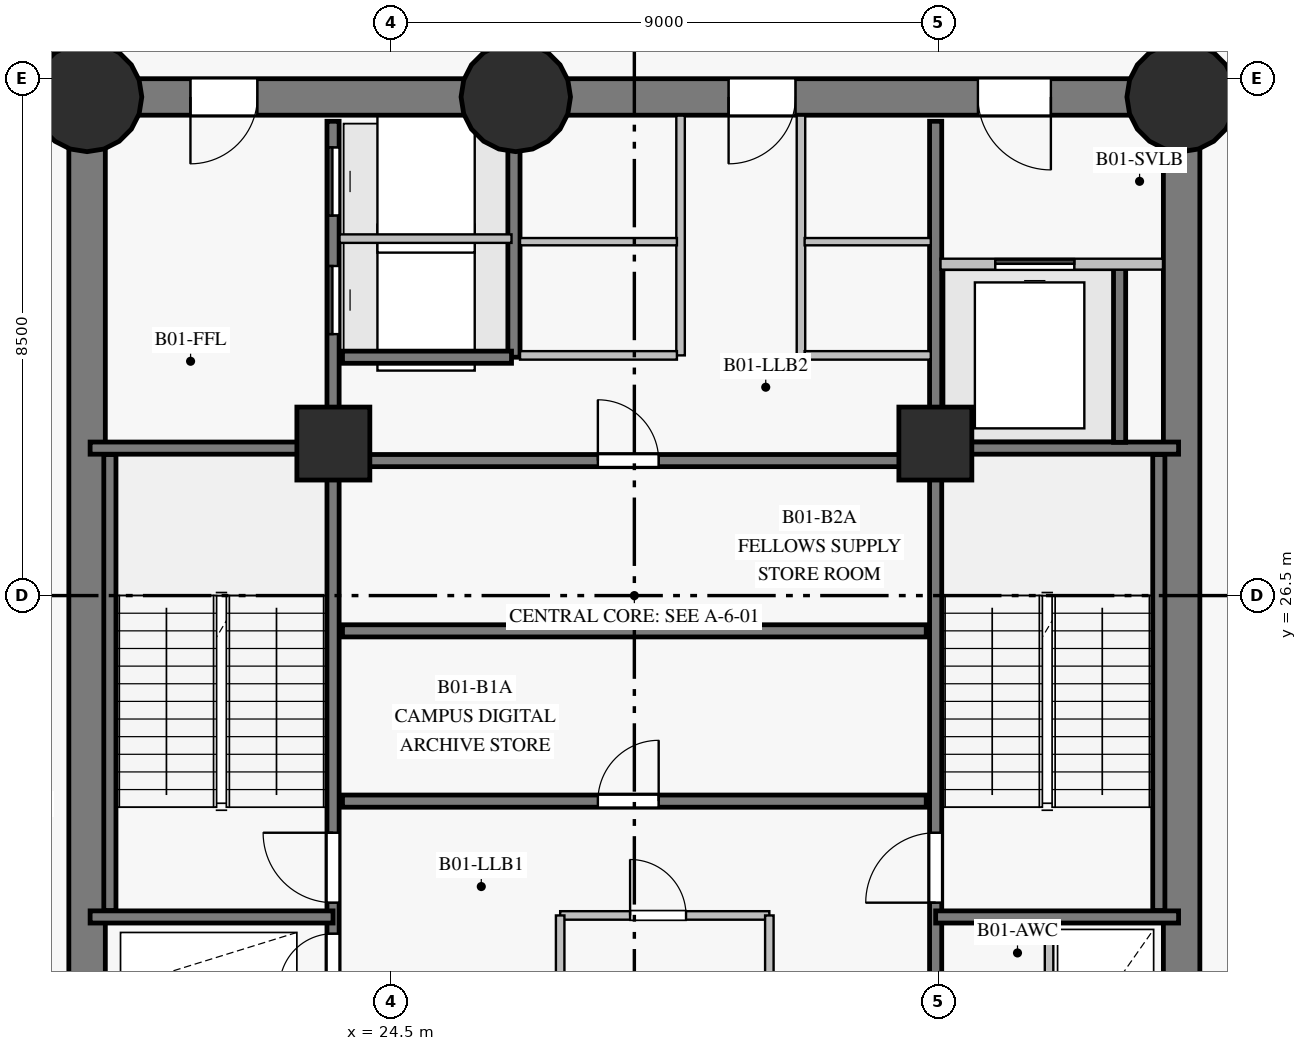
"""IFC4 building model, lengths in metres.
Left out: names, types, materials, properties, quantities, classifications, styles, units other than length and angle.
Written with IfcOpenShell. Run it as: python <this file> out.ifc"""

import sys

from ifc_helpers import new_model, si_unit, direction, frame, frame_2d, origin, origin_with_axes, origin_2d, place, context, subcontext, project, spatial, rectangle, circle, extrude, source, transform, mapped, element, fill, save


model = new_model("IFC4")
c1 = context("Model", 3, precision=1e-05, world=origin(), true_north=direction((0.0, 1.0)))
c2 = subcontext(c1, "Body", "Model", "MODEL_VIEW")
j1 = project(units=[si_unit("LENGTHUNIT", "METRE"), si_unit("PLANEANGLEUNIT", "RADIAN")], contexts=[c1])
p1 = place(None, origin())
s1 = spatial("IfcSite", under=j1, at=p1, CompositionType="ELEMENT")
p2 = place(p1, origin())
s2 = spatial("IfcBuilding", under=s1, at=p2, CompositionType="ELEMENT")
p3 = place(p2, frame((0.0, 0.0, -4.2)))
s3 = spatial("IfcBuildingStorey", under=s2, at=p3, CompositionType="ELEMENT", Elevation=-4.2)
p4 = place(p3, frame((37.5, 18.3, 0.0), z_axis=(0.0, 0.0, 1.0), x_axis=(0.0, 1.0, 0.0)))
e1 = element("IfcWall", 1, at=p4, inside=s3, PredefinedType="SHEAR", context=c2, shape_type="SweptSolid", body=[
    extrude(rectangle(XDim=16.4, YDim=0.6, at=frame_2d((8.2, 0.0))), origin(), (0.0, 0.0, 1.0), 3.85),
])
p5 = place(p3, frame((37.5, 34.7, 0.0), z_axis=(0.0, 0.0, 1.0), x_axis=(-1.0, 0.0, 0.0)))
e2 = element("IfcWall", 2, at=p5, inside=s3, PredefinedType="SHEAR", context=c2, shape_type="SweptSolid", body=[
    extrude(rectangle(XDim=10.95, YDim=0.6, at=frame_2d((5.475, 0.0))), origin(), (0.0, 0.0, 1.0), 3.85),
])
p6 = place(p5, frame((2.15, 0.0, 0.0)))
e3 = element("IfcOpeningElement", 3, at=p6, cuts=e2, PredefinedType="OPENING", context=c2, shape_type="SweptSolid", body=[
    extrude(rectangle(XDim=1.2, YDim=2.15, at=frame_2d((0.6, 1.075))), frame((0.0, 0.31, 0.0), z_axis=(0.0, -1.0, 0.0), x_axis=(1.0, 0.0, 0.0)), (0.0, 0.0, 1.0), 0.62),
])
p7 = place(p5, frame((6.35, 0.0, 0.0)))
e4 = element("IfcOpeningElement", 4, at=p7, cuts=e2, PredefinedType="OPENING", context=c2, shape_type="SweptSolid", body=[
    extrude(rectangle(XDim=1.1, YDim=2.15, at=frame_2d((0.55, 1.075))), frame((0.0, 0.31, 0.0), z_axis=(0.0, -1.0, 0.0), x_axis=(1.0, 0.0, 0.0)), (0.0, 0.0, 1.0), 0.62),
])
p8 = place(p3, frame((26.55, 34.7, 0.0), z_axis=(0.0, 0.0, 1.0), x_axis=(-1.0, 0.0, 0.0)))
e5 = element("IfcWall", 5, at=p8, inside=s3, PredefinedType="SHEAR", context=c2, shape_type="SweptSolid", body=[
    extrude(rectangle(XDim=7.05, YDim=0.6, at=frame_2d((3.525, 0.0))), origin(), (0.0, 0.0, 1.0), 3.85),
])
p9 = place(p8, frame((4.25, 0.0, 0.0)))
e6 = element("IfcOpeningElement", 6, at=p9, cuts=e5, PredefinedType="OPENING", context=c2, shape_type="SweptSolid", body=[
    extrude(rectangle(XDim=1.1, YDim=2.15, at=frame_2d((0.55, 1.075))), frame((0.0, 0.31, 0.0), z_axis=(0.0, -1.0, 0.0), x_axis=(1.0, 0.0, 0.0)), (0.0, 0.0, 1.0), 0.62),
])
p10 = place(p3, frame((19.5, 34.7, 0.0), z_axis=(0.0, 0.0, 1.0), x_axis=(0.0, -1.0, 0.0)))
e7 = element("IfcWall", 7, at=p10, inside=s3, PredefinedType="SHEAR", context=c2, shape_type="SweptSolid", body=[
    extrude(rectangle(XDim=16.4, YDim=0.6, at=frame_2d((8.2, 0.0))), origin(), (0.0, 0.0, 1.0), 3.85),
])
m1 = source(origin_with_axes(), c2, "Body", "SweptSolid", [
    extrude(circle(Radius=0.9, at=origin_2d()), origin(), (0.0, 0.0, 1.0), 4.2),
])
for number, where, z_axis, x_axis in (
    (8, (19.5, 34.7, 0.0), (0.0, 0.0, 1.0), (1.0, 0.0, 0.0)),
    (9, (26.55, 34.7, 0.0), (0.0, 0.0, 1.0), (1.0, 0.0, 0.0)),
    (10, (37.5, 34.7, 0.0), (0.0, 0.0, 1.0), (1.0, 0.0, 0.0)),
):
    element("IfcColumn", number, at=place(p3, frame(where, z_axis=z_axis, x_axis=x_axis)), inside=s3, PredefinedType="COLUMN", context=c2, shape_type="MappedRepresentation", body=[
        mapped(m1, transform((0.0, 0.0, 0.0), scale=1.0)),
    ])
m2 = source(origin_with_axes(), c2, "Body", "SweptSolid", [
    extrude(rectangle(XDim=1.2, YDim=1.2, at=origin_2d()), origin(), (0.0, 0.0, 1.0), 4.2),
])
for number, where, z_axis, x_axis in (
    (11, (23.55, 29.0, 0.0), (0.0, 0.0, 1.0), (1.0, 0.0, 0.0)),
    (12, (33.45, 29.0, 0.0), (0.0, 0.0, 1.0), (1.0, 0.0, 0.0)),
):
    element("IfcColumn", number, at=place(p3, frame(where, z_axis=z_axis, x_axis=x_axis)), inside=s3, PredefinedType="COLUMN", context=c2, shape_type="MappedRepresentation", body=[
        mapped(m2, transform((0.0, 0.0, 0.0), scale=1.0)),
    ])
p11 = place(p3, frame((23.545, 18.7, 0.0), z_axis=(0.0, 0.0, 1.0), x_axis=(0.0, 1.0, 0.0)))
e13 = element("IfcWall", 13, at=p11, inside=s3, PredefinedType="SHEAR", context=c2, shape_type="SweptSolid", body=[
    extrude(rectangle(XDim=15.6, YDim=0.2, at=frame_2d((7.8, 0.0))), origin(), (0.0, 0.0, 1.0), 3.85),
])
p12 = place(p11, frame((2.75, 0.0, 0.0)))
e14 = element("IfcOpeningElement", 14, at=p12, cuts=e13, PredefinedType="OPENING", context=c2, shape_type="SweptSolid", body=[
    extrude(rectangle(XDim=1.15, YDim=2.15, at=frame_2d((0.575, 1.075))), frame((0.0, 0.11, 0.0), z_axis=(0.0, -1.0, 0.0), x_axis=(1.0, 0.0, 0.0)), (0.0, 0.0, 1.0), 0.22),
])
p13 = place(p11, frame((0.14, 0.0, 0.0)))
e15 = element("IfcOpeningElement", 15, at=p13, cuts=e13, PredefinedType="OPENING", context=c2, shape_type="SweptSolid", body=[
    extrude(rectangle(XDim=0.88, YDim=2.1, at=frame_2d((0.44, 1.05))), frame((0.0, 0.11, 0.0), z_axis=(0.0, -1.0, 0.0), x_axis=(1.0, 0.0, 0.0)), (0.0, 0.0, 1.0), 0.22),
])
p14 = place(p11, frame((1.36, 0.0, 0.0)))
e16 = element("IfcOpeningElement", 16, at=p14, cuts=e13, PredefinedType="OPENING", context=c2, shape_type="SweptSolid", body=[
    extrude(rectangle(XDim=0.88, YDim=2.1, at=frame_2d((0.44, 1.05))), frame((0.0, 0.11, 0.0), z_axis=(0.0, -1.0, 0.0), x_axis=(1.0, 0.0, 0.0)), (0.0, 0.0, 1.0), 0.22),
])
p15 = place(p11, frame((12.1, 0.0, 0.0)))
e17 = element("IfcOpeningElement", 17, at=p15, cuts=e13, PredefinedType="OPENING", context=c2, shape_type="SweptSolid", body=[
    extrude(rectangle(XDim=1.12, YDim=2.15, at=frame_2d((0.56, 1.075))), frame((0.0, 0.11, 0.0), z_axis=(0.0, -1.0, 0.0), x_axis=(1.0, 0.0, 0.0)), (0.0, 0.0, 1.0), 0.22),
])
p16 = place(p11, frame((14.05, 0.0, 0.0)))
e18 = element("IfcOpeningElement", 18, at=p16, cuts=e13, PredefinedType="OPENING", context=c2, shape_type="SweptSolid", body=[
    extrude(rectangle(XDim=1.12, YDim=2.15, at=frame_2d((0.56, 1.075))), frame((0.0, 0.11, 0.0), z_axis=(0.0, -1.0, 0.0), x_axis=(1.0, 0.0, 0.0)), (0.0, 0.0, 1.0), 0.22),
])
p17 = place(p3, frame((33.455, 18.7, 0.0), z_axis=(0.0, 0.0, 1.0), x_axis=(0.0, 1.0, 0.0)))
e19 = element("IfcWall", 19, at=p17, inside=s3, PredefinedType="SHEAR", context=c2, shape_type="SweptSolid", body=[
    extrude(rectangle(XDim=15.6, YDim=0.2, at=frame_2d((7.8, 0.0))), origin(), (0.0, 0.0, 1.0), 3.85),
])
p18 = place(p17, frame((2.75, 0.0, 0.0)))
e20 = element("IfcOpeningElement", 20, at=p18, cuts=e19, PredefinedType="OPENING", context=c2, shape_type="SweptSolid", body=[
    extrude(rectangle(XDim=1.15, YDim=2.15, at=frame_2d((0.575, 1.075))), frame((0.0, 0.11, 0.0), z_axis=(0.0, -1.0, 0.0), x_axis=(1.0, 0.0, 0.0)), (0.0, 0.0, 1.0), 0.22),
])
p19 = place(p17, frame((0.55, 0.0, 0.0)))
e21 = element("IfcOpeningElement", 21, at=p19, cuts=e19, PredefinedType="OPENING", context=c2, shape_type="SweptSolid", body=[
    extrude(rectangle(XDim=0.94, YDim=2.1, at=frame_2d((0.47, 1.05))), frame((0.0, 0.11, 0.0), z_axis=(0.0, -1.0, 0.0), x_axis=(1.0, 0.0, 0.0)), (0.0, 0.0, 1.0), 0.22),
])
p20 = place(p3, frame((23.7, 23.12, 0.0), z_axis=(0.0, 0.0, 1.0), x_axis=(1.0, 0.0, 0.0)))
e22 = element("IfcWall", 22, at=p20, inside=s3, PredefinedType="SHEAR", context=c2, shape_type="SweptSolid", body=[
    extrude(rectangle(XDim=9.6, YDim=0.2, at=frame_2d((4.8, 0.0))), origin(), (0.0, 0.0, 1.0), 3.85),
])
p21 = place(p20, frame((4.2, 0.0, 0.0)))
e23 = element("IfcOpeningElement", 23, at=p21, cuts=e22, PredefinedType="OPENING", context=c2, shape_type="SweptSolid", body=[
    extrude(rectangle(XDim=1.0, YDim=2.15, at=frame_2d((0.5, 1.075))), frame((0.0, 0.11, 0.0), z_axis=(0.0, -1.0, 0.0), x_axis=(1.0, 0.0, 0.0)), (0.0, 0.0, 1.0), 0.22),
])
p22 = place(p3, frame((23.7, 25.92, 0.0), z_axis=(0.0, 0.0, 1.0), x_axis=(1.0, 0.0, 0.0)))
e24 = element("IfcWall", 24, at=p22, inside=s3, PredefinedType="SHEAR", context=c2, shape_type="SweptSolid", body=[
    extrude(rectangle(XDim=9.6, YDim=0.2, at=frame_2d((4.8, 0.0))), origin(), (0.0, 0.0, 1.0), 3.85),
])
p23 = place(p3, frame((23.7, 28.72, 0.0), z_axis=(0.0, 0.0, 1.0), x_axis=(1.0, 0.0, 0.0)))
e25 = element("IfcWall", 25, at=p23, inside=s3, PredefinedType="SHEAR", context=c2, shape_type="SweptSolid", body=[
    extrude(rectangle(XDim=9.6, YDim=0.2, at=frame_2d((4.8, 0.0))), origin(), (0.0, 0.0, 1.0), 3.85),
])
p24 = place(p23, frame((4.2, 0.0, 0.0)))
e26 = element("IfcOpeningElement", 26, at=p24, cuts=e25, PredefinedType="OPENING", context=c2, shape_type="SweptSolid", body=[
    extrude(rectangle(XDim=1.0, YDim=2.15, at=frame_2d((0.5, 1.075))), frame((0.0, 0.11, 0.0), z_axis=(0.0, -1.0, 0.0), x_axis=(1.0, 0.0, 0.0)), (0.0, 0.0, 1.0), 0.22),
])
for number, where, z_axis, x_axis in (
    (27, (19.875, 21.32, 0.0), (0.0, 0.0, 1.0), (0.0, 1.0, 0.0)),
    (28, (37.125, 21.32, 0.0), (0.0, 0.0, 1.0), (0.0, 1.0, 0.0)),
):
    element("IfcWall", number, at=place(p3, frame(where, z_axis=z_axis, x_axis=x_axis)), inside=s3, PredefinedType="SHEAR", context=c2, shape_type="SweptSolid", body=[
        extrude(rectangle(XDim=7.5, YDim=0.2, at=frame_2d((3.75, 0.0))), origin(), (0.0, 0.0, 1.0), 3.85),
    ])
for number, where, z_axis, x_axis in (
    (29, (33.455, 21.215, 0.0), (0.0, 0.0, 1.0), (1.0, 0.0, 0.0)),
    (30, (33.455, 28.925, 0.0), (0.0, 0.0, 1.0), (1.0, 0.0, 0.0)),
    (31, (19.55, 21.215, 0.0), (0.0, 0.0, 1.0), (1.0, 0.0, 0.0)),
    (32, (19.55, 28.925, 0.0), (0.0, 0.0, 1.0), (1.0, 0.0, 0.0)),
):
    element("IfcWall", number, at=place(p3, frame(where, z_axis=z_axis, x_axis=x_axis)), inside=s3, PredefinedType="SHEAR", context=c2, shape_type="SweptSolid", body=[
        extrude(rectangle(XDim=3.995, YDim=0.2, at=frame_2d((1.998, 0.0))), origin(), (0.0, 0.0, 1.0), 3.85),
    ])
p25 = place(p3, frame((26.52, 30.42, 0.0), z_axis=(0.0, 0.0, 1.0), x_axis=(0.0, 1.0, 0.0)))
e33 = element("IfcWall", 33, at=p25, inside=s3, PredefinedType="SHEAR", context=c2, shape_type="SweptSolid", body=[
    extrude(rectangle(XDim=3.86, YDim=0.2, at=frame_2d((1.93, 0.0))), origin(), (0.0, 0.0, 1.0), 3.85),
])
p26 = place(p3, frame((36.48, 29.02, 0.0), z_axis=(0.0, 0.0, 1.0), x_axis=(0.0, 1.0, 0.0)))
e34 = element("IfcWall", 34, at=p26, inside=s3, PredefinedType="SHEAR", context=c2, shape_type="SweptSolid", body=[
    extrude(rectangle(XDim=2.86, YDim=0.2, at=frame_2d((1.43, 0.0))), origin(), (0.0, 0.0, 1.0), 3.85),
])
p27 = place(p3, frame((23.7, 30.42, 0.0), z_axis=(0.0, 0.0, 1.0), x_axis=(1.0, 0.0, 0.0)))
e35 = element("IfcWall", 35, at=p27, inside=s3, PredefinedType="SHEAR", context=c2, shape_type="SweptSolid", body=[
    extrude(rectangle(XDim=2.78, YDim=0.2, at=frame_2d((1.39, 0.0))), origin(), (0.0, 0.0, 1.0), 3.85),
])
for number, where, z_axis, x_axis in (
    (36, (29.26, 30.45, 0.0), (0.0, 0.0, 1.0), (0.0, 1.0, 0.0)),
    (37, (31.24, 30.45, 0.0), (0.0, 0.0, 1.0), (0.0, 1.0, 0.0)),
):
    element("IfcWall", number, at=place(p3, frame(where, z_axis=z_axis, x_axis=x_axis)), inside=s3, PredefinedType="PARTITIONING", context=c2, shape_type="SweptSolid", body=[
        extrude(rectangle(XDim=3.943, YDim=0.14, at=frame_2d((1.972, 0.0))), origin(), (0.0, 0.0, 1.0), 3.85),
    ])
p28 = place(p3, frame((33.535, 31.95, 0.0), z_axis=(0.0, 0.0, 1.0), x_axis=(1.0, 0.0, 0.0)))
e38 = element("IfcWall", 38, at=p28, inside=s3, PredefinedType="PARTITIONING", context=c2, shape_type="SweptSolid", body=[
    extrude(rectangle(XDim=3.658, YDim=0.18, at=frame_2d((1.829, 0.0))), origin(), (0.0, 0.0, 1.0), 3.85),
])
p29 = place(p28, frame((0.9, 0.0, 0.0)))
e39 = element("IfcOpeningElement", 39, at=p29, cuts=e38, PredefinedType="OPENING", context=c2, shape_type="SweptSolid", body=[
    extrude(rectangle(XDim=1.3, YDim=2.2, at=frame_2d((0.65, 1.1))), frame((0.0, 0.1, 0.0), z_axis=(0.0, -1.0, 0.0), x_axis=(1.0, 0.0, 0.0)), (0.0, 0.0, 1.0), 0.2),
])
p30 = place(p3, frame((27.28, 21.24, 0.0), z_axis=(0.0, 0.0, 1.0), x_axis=(1.0, 0.0, 0.0)))
e40 = element("IfcWall", 40, at=p30, inside=s3, PredefinedType="PARTITIONING", context=c2, shape_type="SweptSolid", body=[
    extrude(rectangle(XDim=3.44, YDim=0.14, at=frame_2d((1.72, 0.0))), origin(), (0.0, 0.0, 1.0), 3.85),
])
p31 = place(p30, frame((1.15, 0.0, 0.0)))
e41 = element("IfcOpeningElement", 41, at=p31, cuts=e40, PredefinedType="OPENING", context=c2, shape_type="SweptSolid", body=[
    extrude(rectangle(XDim=0.92, YDim=2.1, at=frame_2d((0.46, 1.05))), frame((0.0, 0.08, 0.0), z_axis=(0.0, -1.0, 0.0), x_axis=(1.0, 0.0, 0.0)), (0.0, 0.0, 1.0), 0.16),
])
p32 = place(p3, frame((23.652, 32.37, 0.0), z_axis=(0.0, 0.0, 1.0), x_axis=(1.0, 0.0, 0.0)))
e42 = element("IfcWall", 42, at=p32, inside=s3, PredefinedType="PARTITIONING", context=c2, shape_type="SweptSolid", body=[
    extrude(rectangle(XDim=2.828, YDim=0.14, at=frame_2d((1.414, 0.0))), origin(), (0.0, 0.0, 1.0), 3.85),
])
for number, where, z_axis, x_axis in (
    (43, (27.28, 18.55, 0.0), (0.0, 0.0, 1.0), (0.0, 1.0, 0.0)),
    (44, (30.72, 18.55, 0.0), (0.0, 0.0, 1.0), (0.0, 1.0, 0.0)),
):
    element("IfcWall", number, at=place(p3, frame(where, z_axis=z_axis, x_axis=x_axis)), inside=s3, PredefinedType="PARTITIONING", context=c2, shape_type="SweptSolid", body=[
        extrude(rectangle(XDim=2.69, YDim=0.14, at=frame_2d((1.345, 0.0))), origin(), (0.0, 0.0, 1.0), 3.85),
    ])
p33 = place(p3, frame((26.62, 30.45, 0.0), z_axis=(0.0, 0.0, 1.0), x_axis=(1.0, 0.0, 0.0)))
e45 = element("IfcWall", 45, at=p33, inside=s3, PredefinedType="PARTITIONING", context=c2, shape_type="SweptSolid", body=[
    extrude(rectangle(XDim=2.58, YDim=0.14, at=frame_2d((1.29, 0.0))), origin(), (0.0, 0.0, 1.0), 3.85),
])
p34 = place(p3, frame((26.62, 32.32, 0.0), z_axis=(0.0, 0.0, 1.0), x_axis=(1.0, 0.0, 0.0)))
e46 = element("IfcWall", 46, at=p34, inside=s3, PredefinedType="PARTITIONING", context=c2, shape_type="SweptSolid", body=[
    extrude(rectangle(XDim=2.58, YDim=0.12, at=frame_2d((1.29, 0.0))), origin(), (0.0, 0.0, 1.0), 3.85),
])
p35 = place(p3, frame((35.32, 18.607, 0.0), z_axis=(0.0, 0.0, 1.0), x_axis=(0.0, 1.0, 0.0)))
e47 = element("IfcWall", 47, at=p35, inside=s3, PredefinedType="PARTITIONING", context=c2, shape_type="SweptSolid", body=[
    extrude(rectangle(XDim=2.503, YDim=0.14, at=frame_2d((1.251, 0.0))), origin(), (0.0, 0.0, 1.0), 3.85),
])
p36 = place(p3, frame((31.3, 30.45, 0.0), z_axis=(0.0, 0.0, 1.0), x_axis=(1.0, 0.0, 0.0)))
e48 = element("IfcWall", 48, at=p36, inside=s3, PredefinedType="PARTITIONING", context=c2, shape_type="SweptSolid", body=[
    extrude(rectangle(XDim=2.075, YDim=0.14, at=frame_2d((1.038, 0.0))), origin(), (0.0, 0.0, 1.0), 3.85),
])
p37 = place(p3, frame((31.3, 32.32, 0.0), z_axis=(0.0, 0.0, 1.0), x_axis=(1.0, 0.0, 0.0)))
e49 = element("IfcWall", 49, at=p37, inside=s3, PredefinedType="PARTITIONING", context=c2, shape_type="SweptSolid", body=[
    extrude(rectangle(XDim=2.075, YDim=0.12, at=frame_2d((1.038, 0.0))), origin(), (0.0, 0.0, 1.0), 3.85),
])
m3 = source(origin_with_axes(), c2, "Body", "SweptSolid", [
    extrude(rectangle(XDim=1.15, YDim=2.15, at=frame_2d((0.575, 1.075))), frame((0.0, 0.025, 0.0), z_axis=(0.0, -1.0, 0.0), x_axis=(1.0, 0.0, 0.0)), (0.0, 0.0, 1.0), 0.05),
])
p38 = place(p12, origin())
e50 = element("IfcDoor", 50, at=p38, inside=s3, OperationType="SINGLE_SWING_RIGHT", PredefinedType="DOOR", context=c2, shape_type="MappedRepresentation", body=[
    mapped(m3, transform((0.0, 0.0, 0.0), scale=1.0)),
])
fill(e14, e50)
p39 = place(p18, origin())
e51 = element("IfcDoor", 51, at=p39, inside=s3, OperationType="SINGLE_SWING_LEFT", PredefinedType="DOOR", context=c2, shape_type="MappedRepresentation", body=[
    mapped(m3, transform((0.0, 0.0, 0.0), scale=1.0)),
])
fill(e20, e51)
m4 = source(origin_with_axes(), c2, "Body", "SweptSolid", [
    extrude(rectangle(XDim=1.1, YDim=2.15, at=frame_2d((0.55, 1.075))), frame((0.0, 0.025, 0.0), z_axis=(0.0, -1.0, 0.0), x_axis=(1.0, 0.0, 0.0)), (0.0, 0.0, 1.0), 0.05),
])
p40 = place(p9, origin())
e52 = element("IfcDoor", 52, at=p40, inside=s3, OperationType="SINGLE_SWING_RIGHT", PredefinedType="DOOR", context=c2, shape_type="MappedRepresentation", body=[
    mapped(m4, transform((0.0, 0.0, 0.0), scale=1.0)),
])
fill(e6, e52)
m5 = source(origin_with_axes(), c2, "Body", "SweptSolid", [
    extrude(rectangle(XDim=1.2, YDim=2.15, at=frame_2d((0.6, 1.075))), frame((0.0, 0.025, 0.0), z_axis=(0.0, -1.0, 0.0), x_axis=(1.0, 0.0, 0.0)), (0.0, 0.0, 1.0), 0.05),
])
p41 = place(p6, origin())
e53 = element("IfcDoor", 53, at=p41, inside=s3, OperationType="SINGLE_SWING_LEFT", PredefinedType="DOOR", context=c2, shape_type="MappedRepresentation", body=[
    mapped(m5, transform((0.0, 0.0, 0.0), scale=1.0)),
])
fill(e3, e53)
m6 = source(origin_with_axes(), c2, "Body", "SweptSolid", [
    extrude(rectangle(XDim=1.3, YDim=2.2, at=frame_2d((0.65, 1.1))), frame((0.0, 0.025, 0.0), z_axis=(0.0, -1.0, 0.0), x_axis=(1.0, 0.0, 0.0)), (0.0, 0.0, 1.0), 0.05),
])
p42 = place(p29, origin())
e54 = element("IfcDoor", 54, at=p42, inside=s3, OperationType="SLIDING_TO_LEFT", PredefinedType="DOOR", context=c2, shape_type="MappedRepresentation", body=[
    mapped(m6, transform((0.0, 0.0, 0.0), scale=1.0)),
])
fill(e39, e54)
m7 = source(origin_with_axes(), c2, "Body", "SweptSolid", [
    extrude(rectangle(XDim=0.88, YDim=2.1, at=frame_2d((0.44, 1.05))), frame((0.0, 0.025, 0.0), z_axis=(0.0, -1.0, 0.0), x_axis=(1.0, 0.0, 0.0)), (0.0, 0.0, 1.0), 0.05),
])
p43 = place(p14, origin())
e55 = element("IfcDoor", 55, at=p43, inside=s3, OperationType="SINGLE_SWING_LEFT", PredefinedType="DOOR", context=c2, shape_type="MappedRepresentation", body=[
    mapped(m7, transform((0.0, 0.0, 0.0), scale=1.0)),
])
fill(e16, e55)
m8 = source(origin_with_axes(), c2, "Body", "SweptSolid", [
    extrude(rectangle(XDim=0.92, YDim=2.1, at=frame_2d((0.46, 1.05))), frame((0.0, 0.025, 0.0), z_axis=(0.0, -1.0, 0.0), x_axis=(1.0, 0.0, 0.0)), (0.0, 0.0, 1.0), 0.05),
])
p44 = place(p31, origin())
e56 = element("IfcDoor", 56, at=p44, inside=s3, OperationType="SINGLE_SWING_LEFT", PredefinedType="DOOR", context=c2, shape_type="MappedRepresentation", body=[
    mapped(m8, transform((0.0, 0.0, 0.0), scale=1.0)),
])
fill(e41, e56)
m9 = source(origin_with_axes(), c2, "Body", "SweptSolid", [
    extrude(rectangle(XDim=1.0, YDim=2.15, at=frame_2d((0.5, 1.075))), frame((0.0, 0.025, 0.0), z_axis=(0.0, -1.0, 0.0), x_axis=(1.0, 0.0, 0.0)), (0.0, 0.0, 1.0), 0.05),
])
p45 = place(p21, origin())
e57 = element("IfcDoor", 57, at=p45, inside=s3, OperationType="SINGLE_SWING_RIGHT", PredefinedType="DOOR", context=c2, shape_type="MappedRepresentation", body=[
    mapped(m9, transform((0.0, 0.0, 0.0), scale=1.0)),
])
fill(e23, e57)
p46 = place(p24, origin())
e58 = element("IfcDoor", 58, at=p46, inside=s3, OperationType="SINGLE_SWING_LEFT", PredefinedType="DOOR", context=c2, shape_type="MappedRepresentation", body=[
    mapped(m9, transform((0.0, 0.0, 0.0), scale=1.0)),
])
fill(e26, e58)
p47 = place(p7, origin())
e59 = element("IfcDoor", 59, at=p47, inside=s3, OperationType="SINGLE_SWING_RIGHT", PredefinedType="DOOR", context=c2, shape_type="MappedRepresentation", body=[
    mapped(m4, transform((0.0, 0.0, 0.0), scale=1.0)),
])
fill(e4, e59)
m10 = source(origin_with_axes(), c2, "Body", "SweptSolid", [
    extrude(rectangle(XDim=1.12, YDim=2.15, at=frame_2d((0.56, 1.075))), frame((0.0, 0.025, 0.0), z_axis=(0.0, -1.0, 0.0), x_axis=(1.0, 0.0, 0.0)), (0.0, 0.0, 1.0), 0.05),
])
p48 = place(p15, origin())
e60 = element("IfcDoor", 60, at=p48, inside=s3, OperationType="SLIDING_TO_LEFT", PredefinedType="DOOR", context=c2, shape_type="MappedRepresentation", body=[
    mapped(m10, transform((0.0, 0.0, 0.0), scale=1.0)),
])
fill(e17, e60)
p49 = place(p16, origin())
e61 = element("IfcDoor", 61, at=p49, inside=s3, OperationType="SLIDING_TO_RIGHT", PredefinedType="DOOR", context=c2, shape_type="MappedRepresentation", body=[
    mapped(m10, transform((0.0, 0.0, 0.0), scale=1.0)),
])
fill(e18, e61)
save(model, sys.argv[1])
